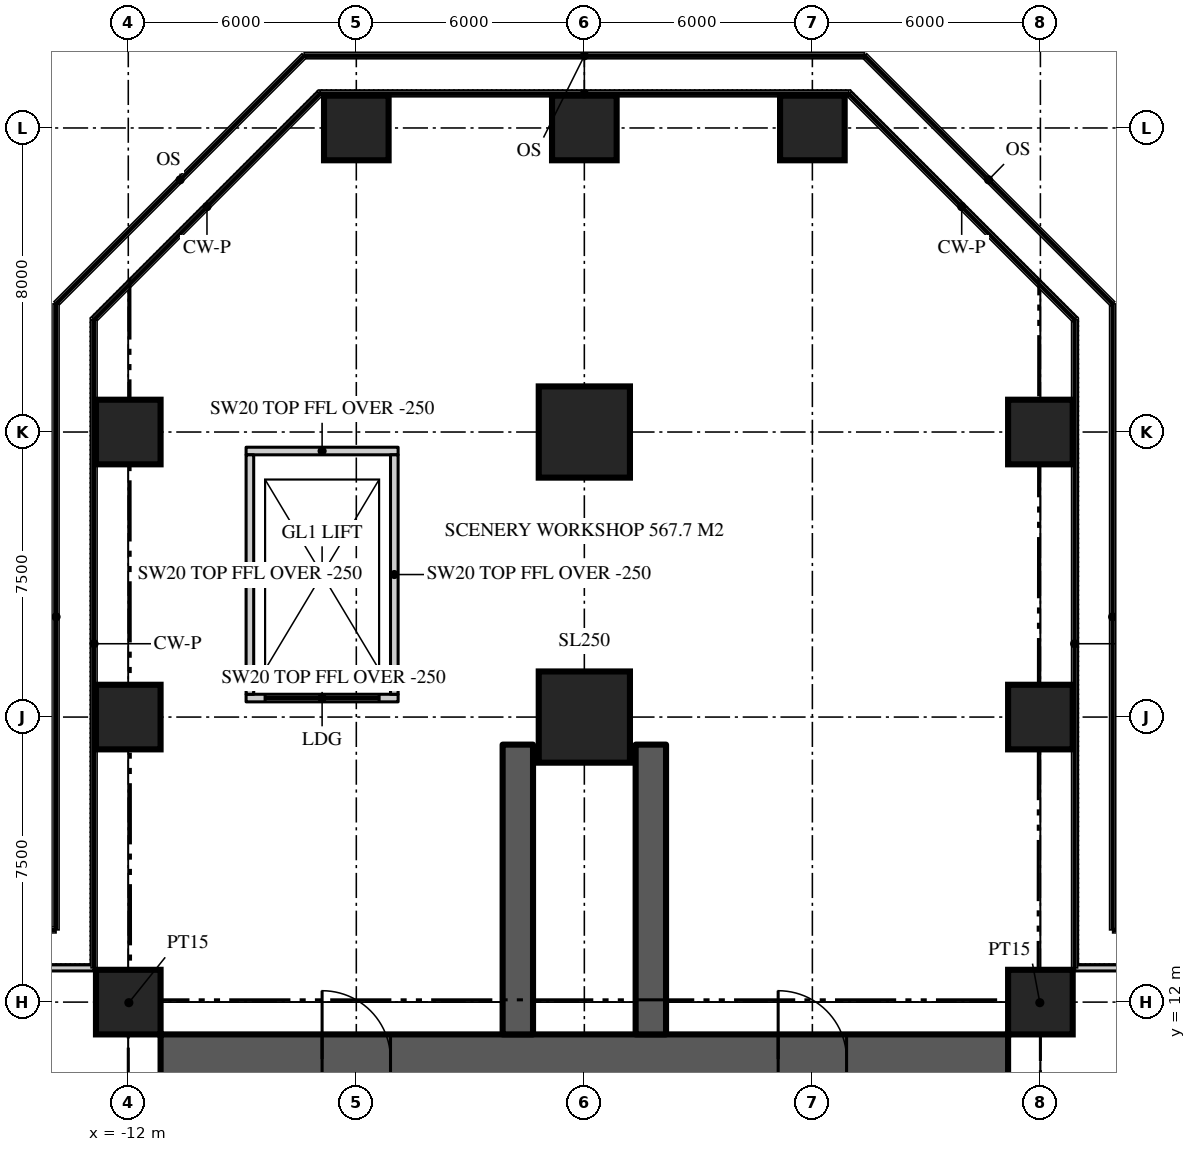
"""IFC4 building model, lengths in metres.
Left out: names, types, materials, properties, quantities, classifications, styles, units other than length and angle.
Written with IfcOpenShell. Run it as: python <this file> out.ifc"""

import sys

from ifc_helpers import new_model, si_unit, direction, frame, frame_2d, origin, origin_2d, place, context, subcontext, project, spatial, rectangle, extrude, element, fill, save


model = new_model("IFC4")
c1 = context("Model", 3, precision=1e-05, world=origin(), true_north=direction((0.0, 1.0)))
c2 = subcontext(c1, "Body", "Model", "MODEL_VIEW")
j1 = project(units=[si_unit("LENGTHUNIT", "METRE"), si_unit("PLANEANGLEUNIT", "RADIAN")], contexts=[c1])
p1 = place(None, origin())
s1 = spatial("IfcSite", under=j1, at=p1, CompositionType="ELEMENT")
p2 = place(p1, origin())
s2 = spatial("IfcBuilding", under=s1, at=p2, CompositionType="ELEMENT")
p3 = place(p2, frame((0.0, 0.0, 7.0)))
s3 = spatial("IfcBuildingStorey", under=s2, at=p3, CompositionType="ELEMENT", Elevation=7.0)
p4 = place(p3, frame((-11.15, 10.5, 0.0), z_axis=(0.0, 0.0, 1.0), x_axis=(1.0, 0.0, 0.0)))
e1 = element("IfcWall", 1, at=p4, inside=s3, PredefinedType="SHEAR", context=c2, shape_type="SweptSolid", body=[
    extrude(rectangle(XDim=22.3, YDim=1.3, at=frame_2d((11.15, 0.0))), origin(), (0.0, 0.0, 1.0), 8.0),
])
p5 = place(p4, frame((4.25, 0.0, 0.0)))
e2 = element("IfcOpeningElement", 2, at=p5, cuts=e1, PredefinedType="OPENING", context=c2, shape_type="SweptSolid", body=[
    extrude(rectangle(XDim=1.8, YDim=2.2, at=frame_2d((0.9, 1.1))), frame((0.0, 0.66, 0.0), z_axis=(0.0, -1.0, 0.0), x_axis=(1.0, 0.0, 0.0)), (0.0, 0.0, 1.0), 1.32),
])
p6 = place(p4, frame((16.25, 0.0, 0.0)))
e3 = element("IfcOpeningElement", 3, at=p6, cuts=e1, PredefinedType="OPENING", context=c2, shape_type="SweptSolid", body=[
    extrude(rectangle(XDim=1.8, YDim=2.2, at=frame_2d((0.9, 1.1))), frame((0.0, 0.66, 0.0), z_axis=(0.0, -1.0, 0.0), x_axis=(1.0, 0.0, 0.0)), (0.0, 0.0, 1.0), 1.32),
])
for number, where, z_axis, x_axis in (
    (4, (1.75, 11.15, 0.0), (0.0, 0.0, 1.0), (0.0, 1.0, 0.0)),
    (5, (-1.75, 11.15, 0.0), (0.0, 0.0, 1.0), (0.0, 1.0, 0.0)),
):
    element("IfcWall", number, at=place(p3, frame(where, z_axis=z_axis, x_axis=x_axis)), inside=s3, PredefinedType="SHEAR", context=c2, shape_type="SweptSolid", body=[
        extrude(rectangle(XDim=7.625, YDim=0.8, at=frame_2d((3.812, 0.0))), origin(), (0.0, 0.0, 1.0), 8.0),
    ])
for number, where, z_axis, x_axis in (
    (6, (-12.0, 12.0, 0.0), (0.0, 0.0, 1.0), (1.0, 0.0, 0.0)),
    (7, (12.0, 12.0, 0.0), (0.0, 0.0, 1.0), (1.0, 0.0, 0.0)),
    (8, (-12.0, 19.5, 0.0), (0.0, 0.0, 1.0), (1.0, 0.0, 0.0)),
):
    element("IfcColumn", number, at=place(p3, frame(where, z_axis=z_axis, x_axis=x_axis)), inside=s3, PredefinedType="COLUMN", context=c2, shape_type="SweptSolid", body=[
        extrude(rectangle(XDim=1.7, YDim=1.7, at=origin_2d()), origin(), (0.0, 0.0, 1.0), 8.0),
    ])
p7 = place(p3, frame((0.0, 19.5, 0.0), z_axis=(0.0, 0.0, 1.0), x_axis=(1.0, 0.0, 0.0)))
e9 = element("IfcColumn", 9, at=p7, inside=s3, PredefinedType="COLUMN", context=c2, shape_type="SweptSolid", body=[
    extrude(rectangle(XDim=2.4, YDim=2.4, at=origin_2d()), origin(), (0.0, 0.0, 1.0), 8.0),
])
for number, where, z_axis, x_axis in (
    (10, (12.0, 19.5, 0.0), (0.0, 0.0, 1.0), (1.0, 0.0, 0.0)),
    (11, (-12.0, 27.0, 0.0), (0.0, 0.0, 1.0), (1.0, 0.0, 0.0)),
):
    element("IfcColumn", number, at=place(p3, frame(where, z_axis=z_axis, x_axis=x_axis)), inside=s3, PredefinedType="COLUMN", context=c2, shape_type="SweptSolid", body=[
        extrude(rectangle(XDim=1.7, YDim=1.7, at=origin_2d()), origin(), (0.0, 0.0, 1.0), 8.0),
    ])
p8 = place(p3, frame((0.0, 27.0, 0.0), z_axis=(0.0, 0.0, 1.0), x_axis=(1.0, 0.0, 0.0)))
e12 = element("IfcColumn", 12, at=p8, inside=s3, PredefinedType="COLUMN", context=c2, shape_type="SweptSolid", body=[
    extrude(rectangle(XDim=2.4, YDim=2.4, at=origin_2d()), origin(), (0.0, 0.0, 1.0), 8.0),
])
for number, where, z_axis, x_axis in (
    (13, (12.0, 27.0, 0.0), (0.0, 0.0, 1.0), (1.0, 0.0, 0.0)),
    (14, (-6.0, 35.0, 0.0), (0.0, 0.0, 1.0), (1.0, 0.0, 0.0)),
    (15, (0.0, 35.0, 0.0), (0.0, 0.0, 1.0), (1.0, 0.0, 0.0)),
    (16, (6.0, 35.0, 0.0), (0.0, 0.0, 1.0), (1.0, 0.0, 0.0)),
):
    element("IfcColumn", number, at=place(p3, frame(where, z_axis=z_axis, x_axis=x_axis)), inside=s3, PredefinedType="COLUMN", context=c2, shape_type="SweptSolid", body=[
        extrude(rectangle(XDim=1.7, YDim=1.7, at=origin_2d()), origin(), (0.0, 0.0, 1.0), 8.0),
    ])
for number, where, z_axis, x_axis in (
    (17, (29.958, 12.9, 0.0), (0.0, 0.0, 1.0), (-1.0, 0.0, 0.0)),
    (18, (-12.9, 12.9, 0.0), (0.0, 0.0, 1.0), (-1.0, 0.0, 0.0)),
):
    element("IfcWall", number, at=place(p3, frame(where, z_axis=z_axis, x_axis=x_axis)), inside=s3, PredefinedType="SOLIDWALL", context=c2, shape_type="SweptSolid", body=[
        extrude(rectangle(XDim=17.059, YDim=0.16, at=frame_2d((8.529, 0.0))), origin(), (0.0, 0.0, 1.0), 7.75),
    ])
for number, where, z_axis, x_axis in (
    (19, (11.15, 11.15, 0.0), (0.0, 0.0, 1.0), (0.707, 0.707, 0.0)),
    (20, (-11.15, 11.15, 0.0), (0.0, 0.0, 1.0), (-0.707, 0.707, 0.0)),
):
    element("IfcWall", number, at=place(p3, frame(where, z_axis=z_axis, x_axis=x_axis)), inside=s3, PredefinedType="PARTITIONING", context=c2, shape_type="SweptSolid", body=[
        extrude(rectangle(XDim=2.362, YDim=0.15, at=frame_2d((1.181, 0.0))), origin(), (0.0, 0.0, 1.0), 7.75),
    ])
p9 = place(p3, frame((-4.9, 20.0, 0.0), z_axis=(0.0, 0.0, 1.0), x_axis=(-1.0, 0.0, 0.0)))
e21 = element("IfcWall", 21, at=p9, inside=s3, PredefinedType="SOLIDWALL", context=c2, shape_type="SweptSolid", body=[
    extrude(rectangle(XDim=4.0, YDim=0.2, at=frame_2d((2.0, 0.0))), origin(), (0.0, 0.0, 1.0), 7.75),
])
p10 = place(p9, frame((0.5, 0.0, 0.0)))
e22 = element("IfcOpeningElement", 22, at=p10, cuts=e21, PredefinedType="OPENING", context=c2, shape_type="SweptSolid", body=[
    extrude(rectangle(XDim=3.0, YDim=3.0, at=frame_2d((1.5, 1.5))), frame((0.0, 0.11, 0.0), z_axis=(0.0, -1.0, 0.0), x_axis=(1.0, 0.0, 0.0)), (0.0, 0.0, 1.0), 0.22),
])
p11 = place(p3, frame((-8.9, 26.5, 0.0), z_axis=(0.0, 0.0, 1.0), x_axis=(1.0, 0.0, 0.0)))
e23 = element("IfcWall", 23, at=p11, inside=s3, PredefinedType="SOLIDWALL", context=c2, shape_type="SweptSolid", body=[
    extrude(rectangle(XDim=4.0, YDim=0.2, at=frame_2d((2.0, 0.0))), origin(), (0.0, 0.0, 1.0), 7.75),
])
for number, where, z_axis, x_axis in (
    (24, (-5.0, 20.1, 0.0), (0.0, 0.0, 1.0), (0.0, 1.0, 0.0)),
    (25, (-8.8, 26.4, 0.0), (0.0, 0.0, 1.0), (0.0, -1.0, 0.0)),
):
    element("IfcWall", number, at=place(p3, frame(where, z_axis=z_axis, x_axis=x_axis)), inside=s3, PredefinedType="SOLIDWALL", context=c2, shape_type="SweptSolid", body=[
        extrude(rectangle(XDim=6.3, YDim=0.2, at=frame_2d((3.15, 0.0))), origin(), (0.0, 0.0, 1.0), 7.75),
    ])
p12 = place(p10, origin())
e26 = element("IfcDoor", 26, at=p12, inside=s3, OperationType="SLIDING_TO_LEFT", PredefinedType="DOOR", context=c2, shape_type="SweptSolid", body=[
    extrude(rectangle(XDim=3.0, YDim=3.0, at=frame_2d((1.5, 1.5))), frame((0.0, 0.025, 0.0), z_axis=(0.0, -1.0, 0.0), x_axis=(1.0, 0.0, 0.0)), (0.0, 0.0, 1.0), 0.05),
])
fill(e22, e26)
p13 = place(p5, origin())
e27 = element("IfcDoor", 27, at=p13, inside=s3, OperationType="DOUBLE_DOOR_DOUBLE_SWING", PredefinedType="DOOR", context=c2, shape_type="SweptSolid", body=[
    extrude(rectangle(XDim=1.8, YDim=2.2, at=frame_2d((0.9, 1.1))), frame((0.0, 0.025, 0.0), z_axis=(0.0, -1.0, 0.0), x_axis=(1.0, 0.0, 0.0)), (0.0, 0.0, 1.0), 0.05),
])
fill(e2, e27)
p14 = place(p6, origin())
e28 = element("IfcDoor", 28, at=p14, inside=s3, OperationType="DOUBLE_DOOR_DOUBLE_SWING", PredefinedType="DOOR", context=c2, shape_type="SweptSolid", body=[
    extrude(rectangle(XDim=1.8, YDim=2.2, at=frame_2d((0.9, 1.1))), frame((0.0, 0.025, 0.0), z_axis=(0.0, -1.0, 0.0), x_axis=(1.0, 0.0, 0.0)), (0.0, 0.0, 1.0), 0.05),
])
fill(e3, e28)
save(model, sys.argv[1])
